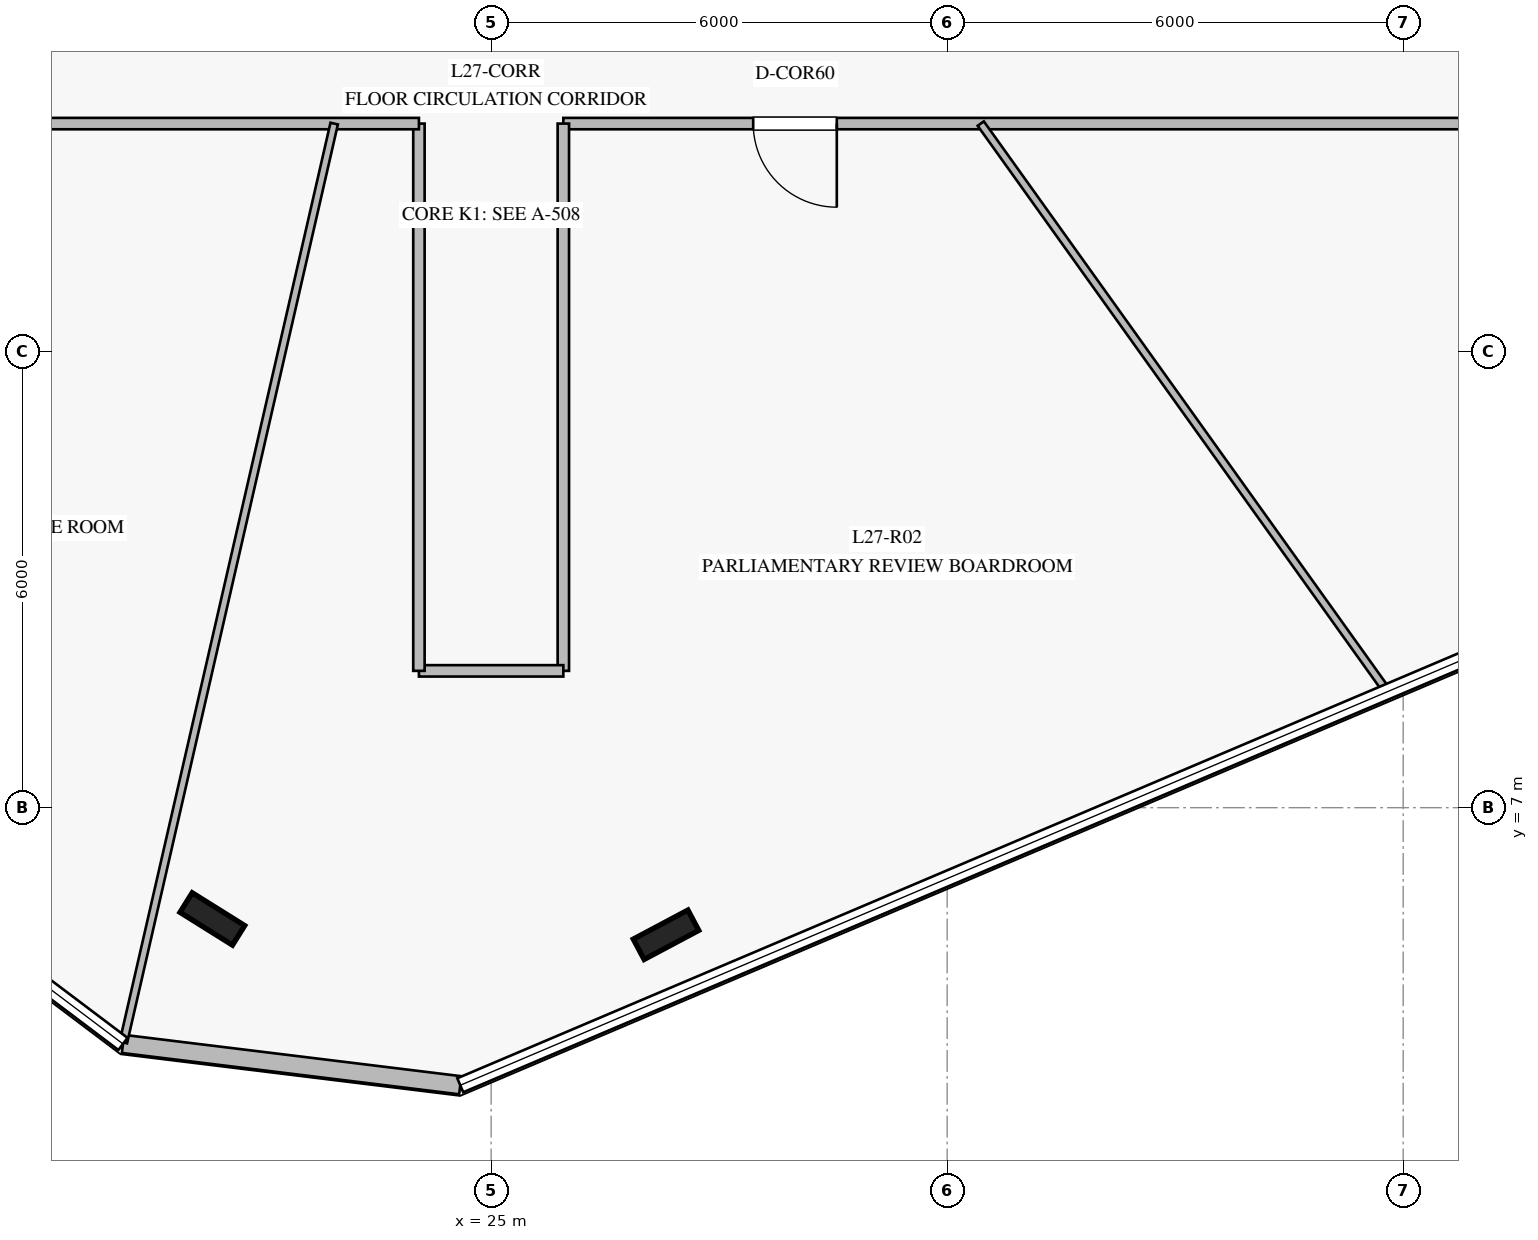
"""IFC4 building model, lengths in metres.
Left out: names, types, materials, properties, quantities, classifications, styles, units other than length and angle.
Written with IfcOpenShell. Run it as: python <this file> out.ifc"""

import sys

from ifc_helpers import new_model, si_unit, direction, frame, frame_2d, origin, origin_2d, place, context, subcontext, project, spatial, rectangle, i_section, extrude, element, fill, save


model = new_model("IFC4")
c1 = context("Model", 3, precision=1e-05, world=origin(), true_north=direction((0.0, 1.0)))
c2 = subcontext(c1, "Body", "Model", "MODEL_VIEW")
j1 = project(units=[si_unit("LENGTHUNIT", "METRE"), si_unit("PLANEANGLEUNIT", "RADIAN")], contexts=[c1])
p1 = place(None, origin())
s1 = spatial("IfcSite", under=j1, at=p1, CompositionType="ELEMENT")
p2 = place(p1, origin())
s2 = spatial("IfcBuilding", under=s1, at=p2, CompositionType="ELEMENT")
p3 = place(p2, frame((0.0, 0.0, 114.4)))
s3 = spatial("IfcBuildingStorey", under=s2, at=p3, CompositionType="ELEMENT", Elevation=114.4)
for number, where, z_axis, x_axis in (
    (1, (21.332, 5.536, 0.0), (0.0, 0.0, 1.0), (-0.848, 0.53, 0.0)),
    (2, (27.301, 5.328, 0.0), (0.0, 0.0, 1.0), (0.883, 0.469, 0.0)),
):
    element("IfcColumn", number, at=place(p3, frame(where, z_axis=z_axis, x_axis=x_axis)), inside=s3, PredefinedType="COLUMN", context=c2, shape_type="SweptSolid", body=[
        extrude(i_section(OverallWidth=0.303, OverallDepth=0.814, WebThickness=0.021, FlangeThickness=0.04, at=origin_2d()), origin(), (0.0, 0.0, 1.0), 4.0),
    ])
p4 = place(p3, frame((20.156, 3.892, 0.0), z_axis=(0.0, 0.0, 1.0), x_axis=(0.992565806089, -0.121709163922, 0.0)))
e3 = element("IfcWall", 3, at=p4, inside=s3, PredefinedType="STANDARD", context=c2, shape_type="SweptSolid", body=[
    extrude(rectangle(XDim=4.471, YDim=0.24, at=frame_2d((2.236, 0.0))), origin(), (0.0, 0.0, 1.0), 3.76),
])
p5 = place(p3, frame((41.2, 16.0, 0.0), z_axis=(0.0, 0.0, 1.0), x_axis=(-1.0, 0.0, 0.0)))
e4 = element("IfcWall", 4, at=p5, inside=s3, PredefinedType="PARTITIONING", context=c2, shape_type="SweptSolid", body=[
    extrude(rectangle(XDim=15.25, YDim=0.15, at=frame_2d((7.625, 0.0))), origin(), (0.0, 0.0, 1.0), 3.21),
])
p6 = place(p5, frame((11.652, 0.0, 0.0)))
e5 = element("IfcOpeningElement", 5, at=p6, cuts=e4, PredefinedType="OPENING", context=c2, shape_type="SweptSolid", body=[
    extrude(rectangle(XDim=1.1, YDim=2.2, at=frame_2d((0.55, 1.1))), frame((0.0, 0.085, 0.0), z_axis=(0.0, -1.0, 0.0), x_axis=(1.0, 0.0, 0.0)), (0.0, 0.0, 1.0), 0.17),
])
p7 = place(p3, frame((25.95, 16.0, 0.0), z_axis=(0.0, 0.0, 1.0), x_axis=(0.0, -1.0, 0.0)))
e6 = element("IfcWall", 6, at=p7, inside=s3, PredefinedType="PARTITIONING", context=c2, shape_type="SweptSolid", body=[
    extrude(rectangle(XDim=7.2, YDim=0.15, at=frame_2d((3.6, 0.0))), origin(), (0.0, 0.0, 1.0), 3.36),
])
p8 = place(p3, frame((25.95, 8.8, 0.0), z_axis=(0.0, 0.0, 1.0), x_axis=(-1.0, 0.0, 0.0)))
e7 = element("IfcWall", 7, at=p8, inside=s3, PredefinedType="PARTITIONING", context=c2, shape_type="SweptSolid", body=[
    extrude(rectangle(XDim=1.9, YDim=0.15, at=frame_2d((0.95, 0.0))), origin(), (0.0, 0.0, 1.0), 3.76),
])
p9 = place(p3, frame((24.05, 8.8, 0.0), z_axis=(0.0, 0.0, 1.0), x_axis=(0.0, 1.0, 0.0)))
e8 = element("IfcWall", 8, at=p9, inside=s3, PredefinedType="PARTITIONING", context=c2, shape_type="SweptSolid", body=[
    extrude(rectangle(XDim=7.2, YDim=0.15, at=frame_2d((3.6, 0.0))), origin(), (0.0, 0.0, 1.0), 3.36),
])
p10 = place(p3, frame((24.05, 16.0, 0.0), z_axis=(0.0, 0.0, 1.0), x_axis=(-1.0, 0.0, 0.0)))
e9 = element("IfcWall", 9, at=p10, inside=s3, PredefinedType="PARTITIONING", context=c2, shape_type="SweptSolid", body=[
    extrude(rectangle(XDim=6.85, YDim=0.15, at=frame_2d((3.425, 0.0))), origin(), (0.0, 0.0, 1.0), 3.21),
])
p11 = place(p3, frame((22.935, 16.0, 0.0), z_axis=(0.0, 0.0, 1.0), x_axis=(-0.223663289935, -0.974666472561, 0.0)))
e10 = element("IfcWall", 10, at=p11, inside=s3, PredefinedType="MOVABLE", context=c2, shape_type="SweptSolid", body=[
    extrude(rectangle(XDim=12.403, YDim=0.1, at=frame_2d((6.202, 0.0))), origin(), (0.0, 0.0, 1.0), 3.16),
])
p12 = place(p3, frame((31.442, 16.0, 0.0), z_axis=(0.0, 0.0, 1.0), x_axis=(0.582000725821, -0.813188265498, 0.0)))
e11 = element("IfcWall", 11, at=p12, inside=s3, PredefinedType="MOVABLE", context=c2, shape_type="SweptSolid", body=[
    extrude(rectangle(XDim=9.174, YDim=0.1, at=frame_2d((4.587, 0.0))), origin(), (0.0, 0.0, 1.0), 3.02),
])
p13 = place(p6, origin())
e12 = element("IfcDoor", 12, at=p13, inside=s3, OperationType="SINGLE_SWING_LEFT", PredefinedType="DOOR", context=c2, shape_type="SweptSolid", body=[
    extrude(rectangle(XDim=1.1, YDim=2.2, at=frame_2d((0.55, 1.1))), frame((0.0, 0.025, 0.0), z_axis=(0.0, -1.0, 0.0), x_axis=(1.0, 0.0, 0.0)), (0.0, 0.0, 1.0), 0.05),
])
fill(e5, e12)
save(model, sys.argv[1])
